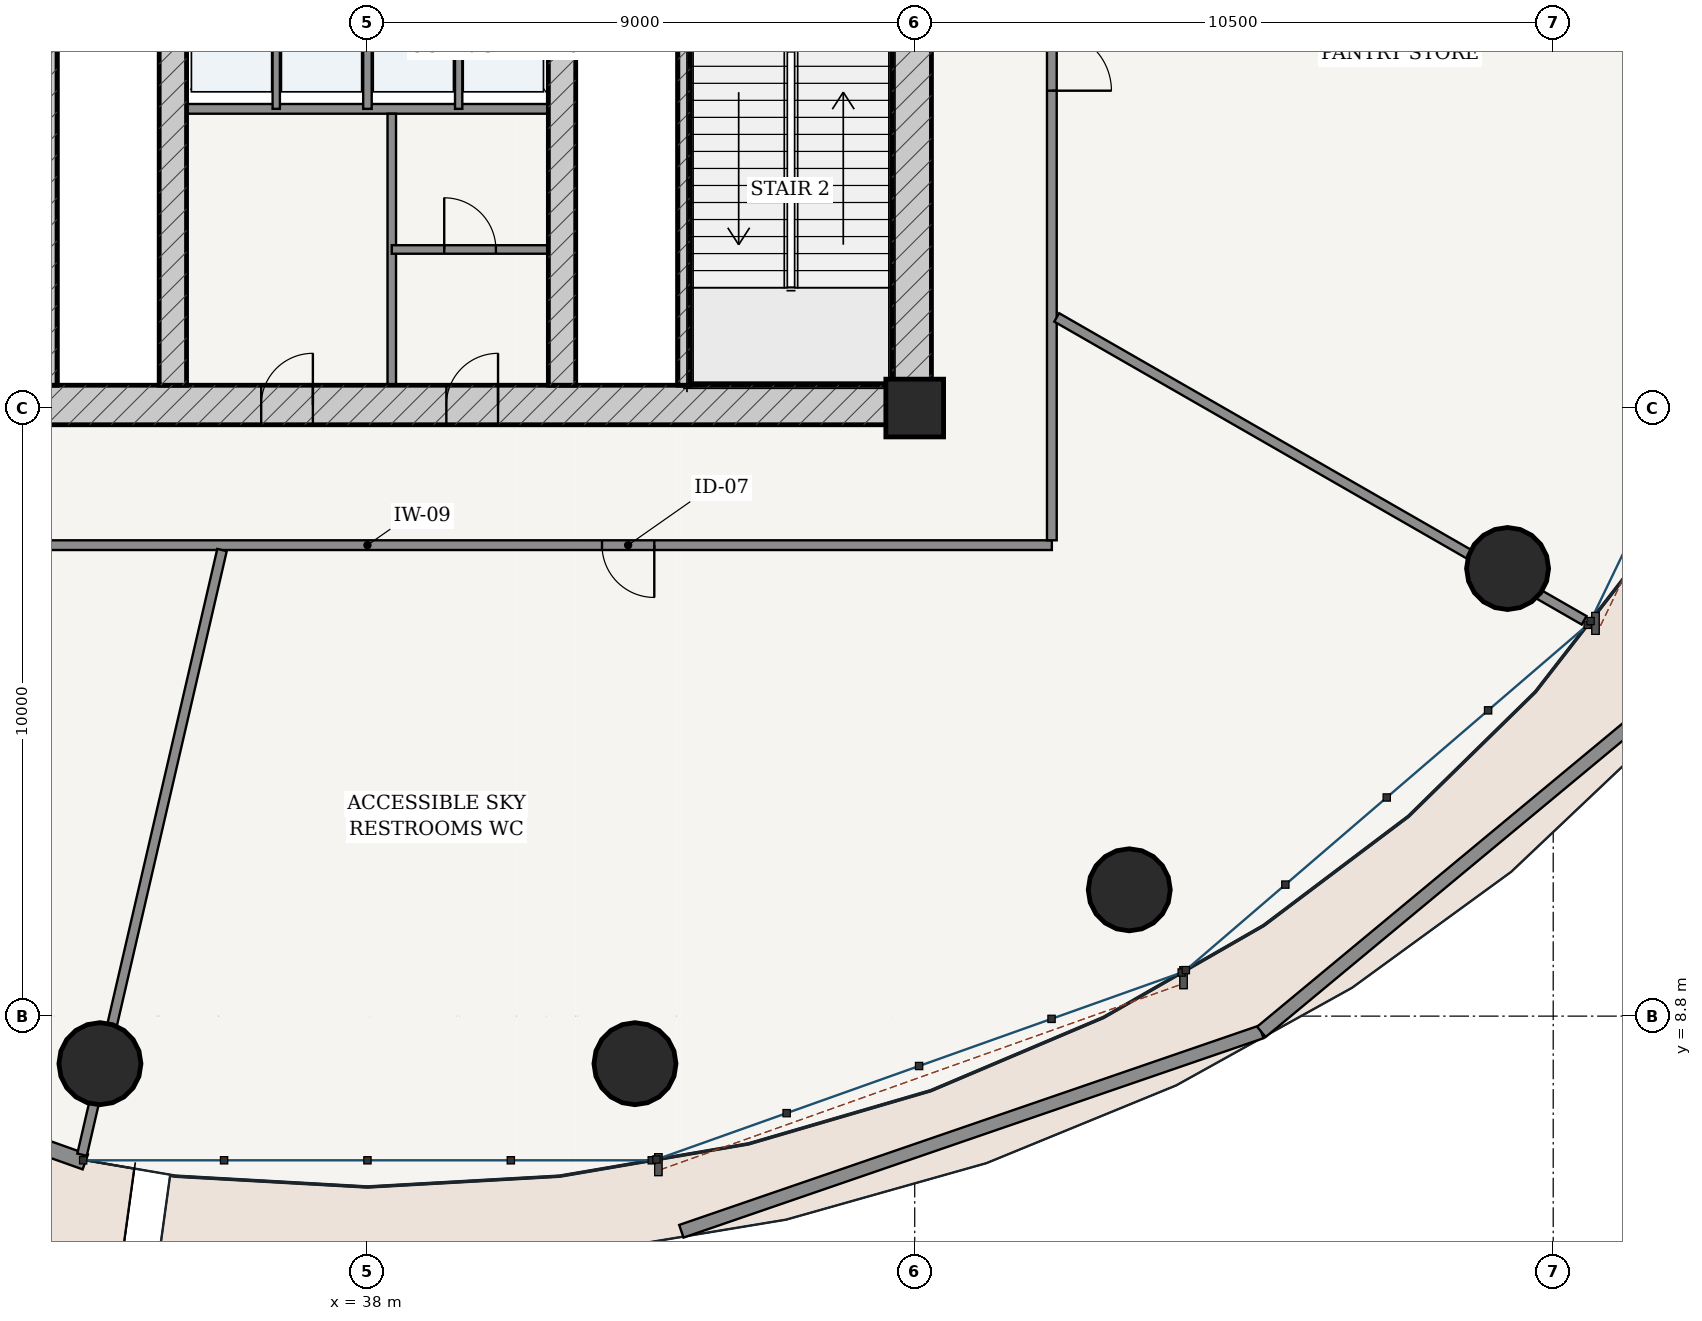
"""IFC4 building model, lengths in metres.
Left out: names, types, materials, properties, quantities, classifications, styles, units other than length and angle.
Written with IfcOpenShell. Run it as: python <this file> out.ifc"""

import sys

from ifc_helpers import new_model, si_unit, direction, frame, frame_2d, origin, origin_2d, place, context, subcontext, project, spatial, rectangle, hollow_circle, extrude, source, transform, mapped, element, fill, save


model = new_model("IFC4")
c1 = context("Model", 3, precision=1e-05, world=origin(), true_north=direction((-0.2419218956, 0.970295726276)))
c2 = subcontext(c1, "Body", "Model", "MODEL_VIEW")
j1 = project(units=[si_unit("LENGTHUNIT", "METRE"), si_unit("PLANEANGLEUNIT", "RADIAN")], contexts=[c1])
p1 = place(None, origin())
s1 = spatial("IfcSite", under=j1, at=p1, CompositionType="ELEMENT")
p2 = place(p1, origin())
s2 = spatial("IfcBuilding", under=s1, at=p2, CompositionType="ELEMENT")
p3 = place(p2, frame((0.0, 0.0, 130.2)))
s3 = spatial("IfcBuildingStorey", under=s2, at=p3, CompositionType="ELEMENT", Elevation=130.2)
p4 = place(p3, frame((47.0, 18.8, 0.0), z_axis=(0.0, 0.0, 1.0), x_axis=(1.0, 0.0, 0.0)))
e1 = element("IfcColumn", 1, at=p4, inside=s3, PredefinedType="COLUMN", context=c2, shape_type="SweptSolid", body=[
    extrude(rectangle(XDim=0.95, YDim=0.95, at=origin_2d()), origin(), (0.0, 0.0, 1.0), 5.2),
])
p5 = place(p3, frame((28.725, 18.85, 0.0), z_axis=(0.0, 0.0, 1.0), x_axis=(1.0, 0.0, 0.0)))
e2 = element("IfcWall", 2, at=p5, inside=s3, PredefinedType="SHEAR", context=c2, shape_type="SweptSolid", body=[
    extrude(rectangle(XDim=18.55, YDim=0.65, at=frame_2d((9.275, 0.0))), origin(), (0.0, 0.0, 1.0), 4.93),
])
p6 = place(p5, frame((7.528, 0.0, 0.0)))
e3 = element("IfcOpeningElement", 3, at=p6, cuts=e2, PredefinedType="OPENING", context=c2, shape_type="SweptSolid", body=[
    extrude(rectangle(XDim=0.85, YDim=2.1, at=frame_2d((0.425, 1.05))), frame((0.0, 0.335, 0.0), z_axis=(0.0, -1.0, 0.0), x_axis=(1.0, 0.0, 0.0)), (0.0, 0.0, 1.0), 0.67),
])
p7 = place(p5, frame((10.573, 0.0, 0.0)))
e4 = element("IfcOpeningElement", 4, at=p7, cuts=e2, PredefinedType="OPENING", context=c2, shape_type="SweptSolid", body=[
    extrude(rectangle(XDim=0.85, YDim=2.1, at=frame_2d((0.425, 1.05))), frame((0.0, 0.335, 0.0), z_axis=(0.0, -1.0, 0.0), x_axis=(1.0, 0.0, 0.0)), (0.0, 0.0, 1.0), 0.67),
])
p8 = place(p3, frame((46.95, 19.175, 0.0), z_axis=(0.0, 0.0, 1.0), x_axis=(0.0, 1.0, 0.0)))
e5 = element("IfcWall", 5, at=p8, inside=s3, PredefinedType="SHEAR", context=c2, shape_type="SweptSolid", body=[
    extrude(rectangle(XDim=15.25, YDim=0.65, at=frame_2d((7.625, 0.0))), origin(), (0.0, 0.0, 1.0), 4.93),
])
p9 = place(p8, frame((9.875, 0.0, 0.0)))
e6 = element("IfcOpeningElement", 6, at=p9, cuts=e5, PredefinedType="OPENING", context=c2, shape_type="SweptSolid", body=[
    extrude(rectangle(XDim=1.5, YDim=2.2, at=frame_2d((0.75, 1.1))), frame((0.0, 0.335, 0.0), z_axis=(0.0, -1.0, 0.0), x_axis=(1.0, 0.0, 0.0)), (0.0, 0.0, 1.0), 0.67),
])
for number, where, z_axis, x_axis in (
    (7, (32.795, 19.175, 0.0), (0.0, 0.0, 1.0), (0.0, 1.0, 0.0)),
    (8, (43.205, 19.175, 0.0), (0.0, 0.0, 1.0), (0.0, 1.0, 0.0)),
):
    element("IfcWall", number, at=place(p3, frame(where, z_axis=z_axis, x_axis=x_axis)), inside=s3, PredefinedType="SOLIDWALL", context=c2, shape_type="SweptSolid", body=[
        extrude(rectangle(XDim=7.375, YDim=0.2, at=frame_2d((3.688, 0.0))), origin(), (0.0, 0.0, 1.0), 4.93),
    ])
p10 = place(p3, frame((34.8, 19.175, 0.0), z_axis=(0.0, 0.0, 1.0), x_axis=(0.0, 1.0, 0.0)))
e9 = element("IfcWall", 9, at=p10, inside=s3, PredefinedType="SHEAR", context=c2, shape_type="SweptSolid", body=[
    extrude(rectangle(XDim=15.25, YDim=0.45, at=frame_2d((7.625, 0.0))), origin(), (0.0, 0.0, 1.0), 4.93),
])
p11 = place(p10, frame((7.8, 0.0, 0.0)))
e10 = element("IfcOpeningElement", 10, at=p11, cuts=e9, PredefinedType="OPENING", context=c2, shape_type="SweptSolid", body=[
    extrude(rectangle(XDim=1.05, YDim=2.15, at=frame_2d((0.525, 1.075))), frame((0.0, 0.235, 0.0), z_axis=(0.0, -1.0, 0.0), x_axis=(1.0, 0.0, 0.0)), (0.0, 0.0, 1.0), 0.47),
])
p12 = place(p3, frame((41.2, 19.175, 0.0), z_axis=(0.0, 0.0, 1.0), x_axis=(0.0, 1.0, 0.0)))
e11 = element("IfcWall", 11, at=p12, inside=s3, PredefinedType="SHEAR", context=c2, shape_type="SweptSolid", body=[
    extrude(rectangle(XDim=15.25, YDim=0.45, at=frame_2d((7.625, 0.0))), origin(), (0.0, 0.0, 1.0), 4.93),
])
p13 = place(p12, frame((7.8, 0.0, 0.0)))
e12 = element("IfcOpeningElement", 12, at=p13, cuts=e11, PredefinedType="OPENING", context=c2, shape_type="SweptSolid", body=[
    extrude(rectangle(XDim=1.05, YDim=2.15, at=frame_2d((0.525, 1.075))), frame((0.0, 0.235, 0.0), z_axis=(0.0, -1.0, 0.0), x_axis=(1.0, 0.0, 0.0)), (0.0, 0.0, 1.0), 0.47),
])
for number, where, z_axis, x_axis in (
    (13, (33.601, 8.018, 0.0), (0.0, 0.0, 1.0), (1.0, 0.0, 0.0)),
    (14, (42.399, 8.018, 0.0), (0.0, 0.0, 1.0), (1.0, 0.0, 0.0)),
    (15, (50.528, 10.877, 0.0), (0.0, 0.0, 1.0), (1.0, 0.0, 0.0)),
    (16, (56.75, 16.161, 0.0), (0.0, 0.0, 1.0), (1.0, 0.0, 0.0)),
):
    element("IfcColumn", number, at=place(p3, frame(where, z_axis=z_axis, x_axis=x_axis)), inside=s3, PredefinedType="COLUMN", context=c2, shape_type="SweptSolid", body=[
        extrude(hollow_circle(Radius=0.675, WallThickness=0.042, at=origin_2d()), origin(), (0.0, 0.0, 1.0), 5.2),
    ])
p14 = place(p3, frame((24.497, 9.557, 0.0), z_axis=(0.0, 0.0, 1.0), x_axis=(0.942103604331, -0.335321932934, 0.0)))
e17 = element("IfcWall", 17, at=p14, inside=s3, PredefinedType="SOLIDWALL", context=c2, shape_type="SweptSolid", body=[
    extrude(rectangle(XDim=9.408, YDim=0.26, at=frame_2d((4.704, 0.0))), origin(), (0.0, 0.0, 1.0), 4.93),
])
p15 = place(p14, frame((3.804, 0.0, 0.0)))
e18 = element("IfcOpeningElement", 18, at=p15, cuts=e17, PredefinedType="OPENING", context=c2, shape_type="SweptSolid", body=[
    extrude(rectangle(XDim=1.8, YDim=2.3, at=frame_2d((0.9, 1.15))), frame((0.0, 0.14, 0.0), z_axis=(0.0, -1.0, 0.0), x_axis=(1.0, 0.0, 0.0)), (0.0, 0.0, 1.0), 0.28),
])
p16 = place(p3, frame((43.162, 5.262, 0.0), z_axis=(0.0, 0.0, 1.0), x_axis=(0.945678925205, 0.325102092309, 0.0)))
e19 = element("IfcWall", 19, at=p16, inside=s3, PredefinedType="PARAPET", context=c2, shape_type="SweptSolid", body=[
    extrude(rectangle(XDim=10.086, YDim=0.22, at=frame_2d((5.043, 0.0))), origin(), (0.0, 0.0, 1.0), 1.15),
])
p17 = place(p3, frame((52.7, 8.541, 0.0), z_axis=(0.0, 0.0, 1.0), x_axis=(0.769514873097, 0.638628890736, 0.0)))
e20 = element("IfcWall", 20, at=p17, inside=s3, PredefinedType="PARAPET", context=c2, shape_type="SweptSolid", body=[
    extrude(rectangle(XDim=9.487, YDim=0.22, at=frame_2d((4.743, 0.0))), origin(), (0.0, 0.0, 1.0), 1.15),
])
p18 = place(p3, frame((35.025, 23.72, 0.0), z_axis=(0.0, 0.0, 1.0), x_axis=(1.0, 0.0, 0.0)))
e21 = element("IfcWall", 21, at=p18, inside=s3, PredefinedType="PARTITIONING", context=c2, shape_type="SweptSolid", body=[
    extrude(rectangle(XDim=5.95, YDim=0.16, at=frame_2d((2.975, 0.0))), origin(), (0.0, 0.0, 1.0), 4.93),
])
p19 = place(p3, frame((36.5, 23.72, 0.0), z_axis=(0.0, 0.0, 1.0), x_axis=(0.0, 1.0, 0.0)))
e22 = element("IfcWall", 22, at=p19, inside=s3, PredefinedType="PARTITIONING", context=c2, shape_type="SweptSolid", body=[
    extrude(rectangle(XDim=2.56, YDim=0.12, at=frame_2d((1.28, 0.0))), origin(), (0.0, 0.0, 1.0), 4.93),
])
p20 = place(p3, frame((38.0, 23.72, 0.0), z_axis=(0.0, 0.0, 1.0), x_axis=(0.0, 1.0, 0.0)))
e23 = element("IfcWall", 23, at=p20, inside=s3, PredefinedType="PARTITIONING", context=c2, shape_type="SweptSolid", body=[
    extrude(rectangle(XDim=2.56, YDim=0.14, at=frame_2d((1.28, 0.0))), origin(), (0.0, 0.0, 1.0), 4.93),
])
p21 = place(p3, frame((39.5, 23.72, 0.0), z_axis=(0.0, 0.0, 1.0), x_axis=(0.0, 1.0, 0.0)))
e24 = element("IfcWall", 24, at=p21, inside=s3, PredefinedType="PARTITIONING", context=c2, shape_type="SweptSolid", body=[
    extrude(rectangle(XDim=2.56, YDim=0.12, at=frame_2d((1.28, 0.0))), origin(), (0.0, 0.0, 1.0), 4.93),
])
p22 = place(p3, frame((38.4, 19.175, 0.0), z_axis=(0.0, 0.0, 1.0), x_axis=(0.0, 1.0, 0.0)))
e25 = element("IfcWall", 25, at=p22, inside=s3, PredefinedType="PARTITIONING", context=c2, shape_type="SweptSolid", body=[
    extrude(rectangle(XDim=4.465, YDim=0.14, at=frame_2d((2.232, 0.0))), origin(), (0.0, 0.0, 1.0), 4.93),
])
p23 = place(p3, frame((38.4, 21.407, 0.0), z_axis=(0.0, 0.0, 1.0), x_axis=(1.0, 0.0, 0.0)))
e26 = element("IfcWall", 26, at=p23, inside=s3, PredefinedType="PARTITIONING", context=c2, shape_type="SweptSolid", body=[
    extrude(rectangle(XDim=2.575, YDim=0.14, at=frame_2d((1.288, 0.0))), origin(), (0.0, 0.0, 1.0), 4.93),
])
p24 = place(p23, frame((0.863, 0.0, 0.0)))
e27 = element("IfcOpeningElement", 27, at=p24, cuts=e26, PredefinedType="OPENING", context=c2, shape_type="SweptSolid", body=[
    extrude(rectangle(XDim=0.85, YDim=2.1, at=frame_2d((0.425, 1.05))), frame((0.0, 0.08, 0.0), z_axis=(0.0, -1.0, 0.0), x_axis=(1.0, 0.0, 0.0)), (0.0, 0.0, 1.0), 0.16),
])
p25 = place(p3, frame((26.745, 16.545, 0.0), z_axis=(0.0, 0.0, 1.0), x_axis=(1.0, 0.0, 0.0)))
e28 = element("IfcWall", 28, at=p25, inside=s3, PredefinedType="PARTITIONING", context=c2, shape_type="SweptSolid", body=[
    extrude(rectangle(XDim=22.51, YDim=0.16, at=frame_2d((11.255, 0.0))), origin(), (0.0, 0.0, 1.0), 4.376),
])
p26 = place(p25, frame((4.086, 0.0, 0.0)))
e29 = element("IfcOpeningElement", 29, at=p26, cuts=e28, PredefinedType="OPENING", context=c2, shape_type="SweptSolid", body=[
    extrude(rectangle(XDim=0.98, YDim=2.2, at=frame_2d((0.49, 1.1))), frame((0.0, 0.09, 0.0), z_axis=(0.0, -1.0, 0.0), x_axis=(1.0, 0.0, 0.0)), (0.0, 0.0, 1.0), 0.18),
])
p27 = place(p25, frame((15.112, 0.0, 0.0)))
e30 = element("IfcOpeningElement", 30, at=p27, cuts=e28, PredefinedType="OPENING", context=c2, shape_type="SweptSolid", body=[
    extrude(rectangle(XDim=0.86, YDim=2.1, at=frame_2d((0.43, 1.05))), frame((0.0, 0.09, 0.0), z_axis=(0.0, -1.0, 0.0), x_axis=(1.0, 0.0, 0.0)), (0.0, 0.0, 1.0), 0.18),
])
p28 = place(p3, frame((49.255, 16.625, 0.0), z_axis=(0.0, 0.0, 1.0), x_axis=(0.0, 1.0, 0.0)))
e31 = element("IfcWall", 31, at=p28, inside=s3, PredefinedType="PARTITIONING", context=c2, shape_type="SweptSolid", body=[
    extrude(rectangle(XDim=20.35, YDim=0.16, at=frame_2d((10.175, 0.0))), origin(), (0.0, 0.0, 1.0), 4.376),
])
p29 = place(p28, frame((7.394, 0.0, 0.0)))
e32 = element("IfcOpeningElement", 32, at=p29, cuts=e31, PredefinedType="OPENING", context=c2, shape_type="SweptSolid", body=[
    extrude(rectangle(XDim=0.98, YDim=2.2, at=frame_2d((0.49, 1.1))), frame((0.0, 0.09, 0.0), z_axis=(0.0, -1.0, 0.0), x_axis=(1.0, 0.0, 0.0)), (0.0, 0.0, 1.0), 0.18),
])
p30 = place(p3, frame((35.608, 16.465, 0.0), z_axis=(0.0, 0.0, 1.0), x_axis=(-0.225467400409, -0.97425071278, 0.0)))
e33 = element("IfcWall", 33, at=p30, inside=s3, PredefinedType="PARTITIONING", context=c2, shape_type="SweptSolid", body=[
    extrude(rectangle(XDim=10.207, YDim=0.16, at=frame_2d((5.103, 0.0))), origin(), (0.0, 0.0, 1.0), 4.376),
])
p31 = place(p3, frame((49.335, 20.29, 0.0), z_axis=(0.0, 0.0, 1.0), x_axis=(0.867165650495, -0.498019813463, 0.0)))
e34 = element("IfcWall", 34, at=p31, inside=s3, PredefinedType="PARTITIONING", context=c2, shape_type="SweptSolid", body=[
    extrude(rectangle(XDim=10.002, YDim=0.16, at=frame_2d((5.001, 0.0))), origin(), (0.0, 0.0, 1.0), 4.376),
])
m1 = source(origin(), c2, "Body", "SweptSolid", [
    extrude(rectangle(XDim=0.85, YDim=2.1, at=frame_2d((0.425, 1.05))), frame((0.0, 0.025, 0.0), z_axis=(0.0, -1.0, 0.0), x_axis=(1.0, 0.0, 0.0)), (0.0, 0.0, 1.0), 0.05),
])
p32 = place(p6, origin())
e35 = element("IfcDoor", 35, at=p32, inside=s3, OperationType="SINGLE_SWING_RIGHT", PredefinedType="DOOR", context=c2, shape_type="MappedRepresentation", body=[
    mapped(m1, transform((0.0, 0.0, 0.0), scale=1.0)),
])
fill(e3, e35)
p33 = place(p7, origin())
e36 = element("IfcDoor", 36, at=p33, inside=s3, OperationType="SINGLE_SWING_RIGHT", PredefinedType="DOOR", context=c2, shape_type="MappedRepresentation", body=[
    mapped(m1, transform((0.0, 0.0, 0.0), scale=1.0)),
])
fill(e4, e36)
p34 = place(p24, origin())
e37 = element("IfcDoor", 37, at=p34, inside=s3, OperationType="SINGLE_SWING_LEFT", PredefinedType="DOOR", context=c2, shape_type="MappedRepresentation", body=[
    mapped(m1, transform((0.0, 0.0, 0.0), scale=1.0)),
])
fill(e27, e37)
m2 = source(origin(), c2, "Body", "SweptSolid", [
    extrude(rectangle(XDim=0.86, YDim=2.1, at=frame_2d((0.43, 1.05))), frame((0.0, 0.025, 0.0), z_axis=(0.0, -1.0, 0.0), x_axis=(1.0, 0.0, 0.0)), (0.0, 0.0, 1.0), 0.05),
])
p35 = place(p27, frame((0.86, 0.0, 0.0), z_axis=(0.0, 0.0, 1.0), x_axis=(-1.0, 0.0, 0.0)))
e38 = element("IfcDoor", 38, at=p35, inside=s3, OperationType="SINGLE_SWING_LEFT", PredefinedType="DOOR", context=c2, shape_type="MappedRepresentation", body=[
    mapped(m2, transform((0.0, 0.0, 0.0), scale=1.0)),
])
fill(e30, e38)
m3 = source(origin(), c2, "Body", "SweptSolid", [
    extrude(rectangle(XDim=0.98, YDim=2.2, at=frame_2d((0.49, 1.1))), frame((0.0, 0.025, 0.0), z_axis=(0.0, -1.0, 0.0), x_axis=(1.0, 0.0, 0.0)), (0.0, 0.0, 1.0), 0.05),
])
p36 = place(p29, frame((0.98, 0.0, 0.0), z_axis=(0.0, 0.0, 1.0), x_axis=(-1.0, 0.0, 0.0)))
e39 = element("IfcDoor", 39, at=p36, inside=s3, OperationType="SINGLE_SWING_RIGHT", PredefinedType="DOOR", context=c2, shape_type="MappedRepresentation", body=[
    mapped(m3, transform((0.0, 0.0, 0.0), scale=1.0)),
])
fill(e32, e39)
save(model, sys.argv[1])
